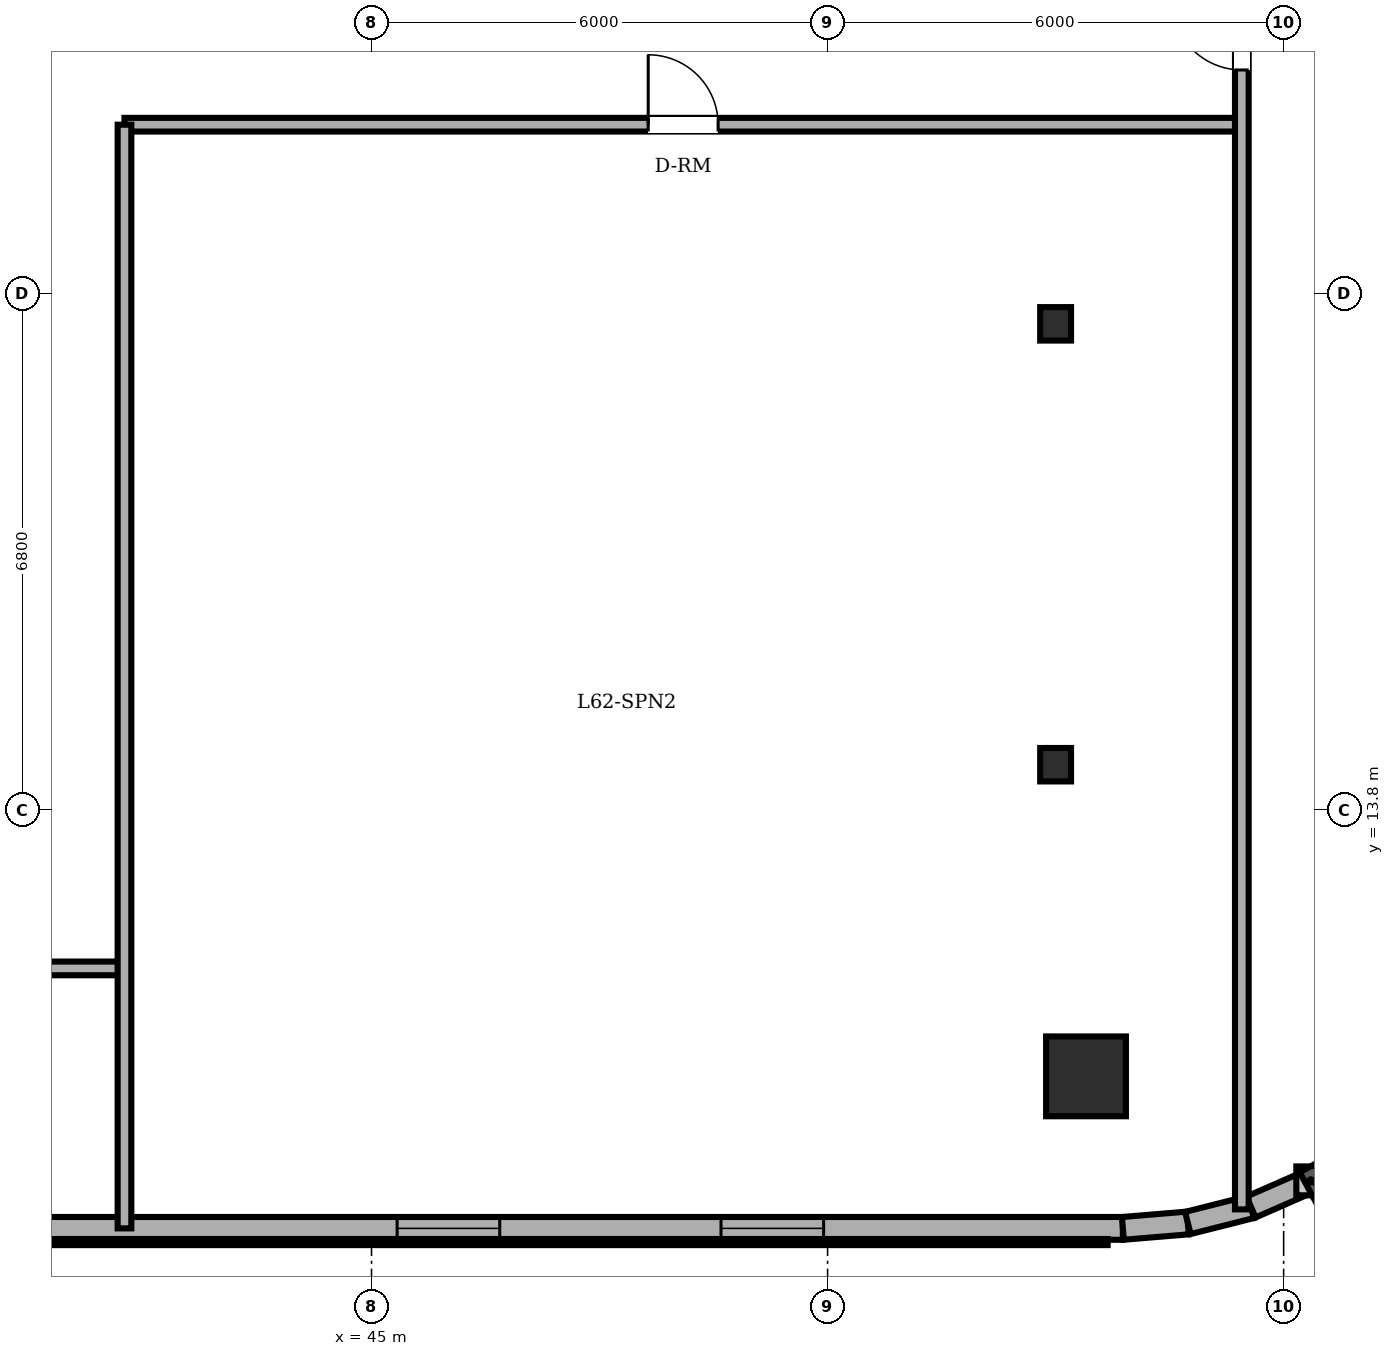
"""IFC4 building model, lengths in metres.
Left out: names, types, materials, properties, quantities, classifications, styles, units other than length and angle.
Written with IfcOpenShell. Run it as: python <this file> out.ifc"""

import sys

from ifc_helpers import new_model, si_unit, direction, frame, frame_2d, origin, origin_2d, place, context, subcontext, project, spatial, rectangle, circle, i_section, extrude, element, fill, save


model = new_model("IFC4")
c1 = context("Model", 3, precision=1e-05, world=origin(), true_north=direction((0.0, 1.0)))
c2 = subcontext(c1, "Body", "Model", "MODEL_VIEW")
j1 = project(units=[si_unit("LENGTHUNIT", "METRE"), si_unit("PLANEANGLEUNIT", "RADIAN")], contexts=[c1])
p1 = place(None, origin())
s1 = spatial("IfcSite", under=j1, at=p1, CompositionType="ELEMENT")
p2 = place(p1, origin())
s2 = spatial("IfcBuilding", under=s1, at=p2, CompositionType="ELEMENT")
p3 = place(p2, frame((0.0, 0.0, 237.3)))
s3 = spatial("IfcBuildingStorey", under=s2, at=p3, CompositionType="ELEMENT", Elevation=237.3)
p4 = place(p3, frame((54.4, 10.3, 0.0), z_axis=(0.0, 0.0, 1.0), x_axis=(1.0, 0.0, 0.0)))
e1 = element("IfcColumn", 1, at=p4, inside=s3, PredefinedType="COLUMN", context=c2, shape_type="SweptSolid", body=[
    extrude(circle(Radius=0.525, at=origin_2d()), origin(), (0.0, 0.0, 1.0), 3.6),
])
for number, where, z_axis, x_axis in (
    (2, (54.0, 14.4, 0.0), (0.0, 0.0, 1.0), (1.0, 0.0, 0.0)),
    (3, (54.0, 20.2, 0.0), (0.0, 0.0, 1.0), (1.0, 0.0, 0.0)),
):
    element("IfcColumn", number, at=place(p3, frame(where, z_axis=z_axis, x_axis=x_axis)), inside=s3, PredefinedType="COLUMN", context=c2, shape_type="SweptSolid", body=[
        extrude(i_section(OverallWidth=0.406, OverallDepth=0.44, WebThickness=0.024, FlangeThickness=0.039, FilletRadius=0.015, at=origin_2d()), origin(), (0.0, 0.0, 1.0), 3.6),
    ])
p5 = place(p3, frame((22.4, 8.3, 0.0), z_axis=(0.0, 0.0, 1.0), x_axis=(1.0, 0.0, 0.0)))
e4 = element("IfcWall", 4, at=p5, inside=s3, PredefinedType="SOLIDWALL", context=c2, shape_type="SweptSolid", body=[
    extrude(rectangle(XDim=32.485, YDim=0.3, at=frame_2d((16.243, 0.0))), origin(), (0.0, 0.0, 1.0), 3.4),
])
p6 = place(p5, frame((5.413, 0.0, 0.0)))
e5 = element("IfcOpeningElement", 5, at=p6, cuts=e4, PredefinedType="OPENING", context=c2, shape_type="SweptSolid", body=[
    extrude(rectangle(XDim=0.95, YDim=2.2, at=frame_2d((0.475, 1.1))), frame((0.0, 0.16, 0.0), z_axis=(0.0, -1.0, 0.0), x_axis=(1.0, 0.0, 0.0)), (0.0, 0.0, 1.0), 0.32),
])
p7 = place(p5, frame((1.3, 0.0, 0.85)))
e6 = element("IfcOpeningElement", 6, at=p7, cuts=e4, PredefinedType="OPENING", context=c2, shape_type="SweptSolid", body=[
    extrude(rectangle(XDim=1.35, YDim=1.55, at=frame_2d((0.675, 0.775))), frame((0.0, 0.16, 0.0), z_axis=(0.0, -1.0, 0.0), x_axis=(1.0, 0.0, 0.0)), (0.0, 0.0, 1.0), 0.32),
])
p8 = place(p5, frame((10.708, 0.0, 0.85)))
e7 = element("IfcOpeningElement", 7, at=p8, cuts=e4, PredefinedType="OPENING", context=c2, shape_type="SweptSolid", body=[
    extrude(rectangle(XDim=1.35, YDim=1.55, at=frame_2d((0.675, 0.775))), frame((0.0, 0.16, 0.0), z_axis=(0.0, -1.0, 0.0), x_axis=(1.0, 0.0, 0.0)), (0.0, 0.0, 1.0), 0.32),
])
p9 = place(p5, frame((14.692, 0.0, 0.85)))
e8 = element("IfcOpeningElement", 8, at=p9, cuts=e4, PredefinedType="OPENING", context=c2, shape_type="SweptSolid", body=[
    extrude(rectangle(XDim=1.35, YDim=1.55, at=frame_2d((0.675, 0.775))), frame((0.0, 0.16, 0.0), z_axis=(0.0, -1.0, 0.0), x_axis=(1.0, 0.0, 0.0)), (0.0, 0.0, 1.0), 0.32),
])
p10 = place(p5, frame((22.937, 0.0, 0.85)))
e9 = element("IfcOpeningElement", 9, at=p10, cuts=e4, PredefinedType="OPENING", context=c2, shape_type="SweptSolid", body=[
    extrude(rectangle(XDim=1.35, YDim=1.55, at=frame_2d((0.675, 0.775))), frame((0.0, 0.16, 0.0), z_axis=(0.0, -1.0, 0.0), x_axis=(1.0, 0.0, 0.0)), (0.0, 0.0, 1.0), 0.32),
])
p11 = place(p5, frame((27.198, 0.0, 0.85)))
e10 = element("IfcOpeningElement", 10, at=p11, cuts=e4, PredefinedType="OPENING", context=c2, shape_type="SweptSolid", body=[
    extrude(rectangle(XDim=1.35, YDim=1.55, at=frame_2d((0.675, 0.775))), frame((0.0, 0.16, 0.0), z_axis=(0.0, -1.0, 0.0), x_axis=(1.0, 0.0, 0.0)), (0.0, 0.0, 1.0), 0.32),
])
p12 = place(p3, frame((54.885, 8.3, 0.0), z_axis=(0.0, 0.0, 1.0), x_axis=(0.996565355958, 0.082809971041, 0.0)))
e11 = element("IfcWall", 11, at=p12, inside=s3, PredefinedType="SOLIDWALL", context=c2, shape_type="SweptSolid", body=[
    extrude(rectangle(XDim=0.858, YDim=0.3, at=frame_2d((0.429, 0.0))), origin(), (0.0, 0.0, 1.0), 3.4),
])
p13 = place(p3, frame((55.74, 8.371, 0.0), z_axis=(0.0, 0.0, 1.0), x_axis=(0.969536346338, 0.244947490555, 0.0)))
e12 = element("IfcWall", 12, at=p13, inside=s3, PredefinedType="SOLIDWALL", context=c2, shape_type="SweptSolid", body=[
    extrude(rectangle(XDim=0.857, YDim=0.3, at=frame_2d((0.429, 0.0))), origin(), (0.0, 0.0, 1.0), 3.4),
])
p14 = place(p3, frame((56.571, 8.581, 0.0), z_axis=(0.0, 0.0, 1.0), x_axis=(0.916085473636, 0.400983048261, 0.0)))
e13 = element("IfcWall", 13, at=p14, inside=s3, PredefinedType="SOLIDWALL", context=c2, shape_type="SweptSolid", body=[
    extrude(rectangle(XDim=0.858, YDim=0.3, at=frame_2d((0.429, 0.0))), origin(), (0.0, 0.0, 1.0), 3.4),
])
p15 = place(p3, frame((17.677, 11.72, 0.0), z_axis=(0.0, 0.0, 1.0), x_axis=(1.0, 0.0, 0.0)))
e14 = element("IfcWall", 14, at=p15, inside=s3, PredefinedType="PARTITIONING", context=c2, shape_type="SweptSolid", body=[
    extrude(rectangle(XDim=24.073, YDim=0.18, at=frame_2d((12.037, 0.0))), origin(), (0.0, 0.0, 1.0), 3.4),
])
p16 = place(p15, frame((9.763, 0.0, 0.0)))
e15 = element("IfcOpeningElement", 15, at=p16, cuts=e14, PredefinedType="OPENING", context=c2, shape_type="SweptSolid", body=[
    extrude(rectangle(XDim=0.92, YDim=2.1, at=frame_2d((0.46, 1.05))), frame((0.0, 0.1, 0.0), z_axis=(0.0, -1.0, 0.0), x_axis=(1.0, 0.0, 0.0)), (0.0, 0.0, 1.0), 0.2),
])
p17 = place(p15, frame((4.063, 0.0, 0.0)))
e16 = element("IfcOpeningElement", 16, at=p17, cuts=e14, PredefinedType="OPENING", context=c2, shape_type="SweptSolid", body=[
    extrude(rectangle(XDim=0.92, YDim=2.1, at=frame_2d((0.46, 1.05))), frame((0.0, 0.1, 0.0), z_axis=(0.0, -1.0, 0.0), x_axis=(1.0, 0.0, 0.0)), (0.0, 0.0, 1.0), 0.2),
])
p18 = place(p15, frame((17.378, 0.0, 0.0)))
e17 = element("IfcOpeningElement", 17, at=p18, cuts=e14, PredefinedType="OPENING", context=c2, shape_type="SweptSolid", body=[
    extrude(rectangle(XDim=0.92, YDim=2.1, at=frame_2d((0.46, 1.05))), frame((0.0, 0.1, 0.0), z_axis=(0.0, -1.0, 0.0), x_axis=(1.0, 0.0, 0.0)), (0.0, 0.0, 1.0), 0.2),
])
p19 = place(p3, frame((41.75, 22.82, 0.0), z_axis=(0.0, 0.0, 1.0), x_axis=(1.0, 0.0, 0.0)))
e18 = element("IfcWall", 18, at=p19, inside=s3, PredefinedType="PARTITIONING", context=c2, shape_type="SweptSolid", body=[
    extrude(rectangle(XDim=14.7, YDim=0.18, at=frame_2d((7.35, 0.0))), origin(), (0.0, 0.0, 1.0), 3.4),
])
p20 = place(p19, frame((6.89, 0.0, 0.0)))
e19 = element("IfcOpeningElement", 19, at=p20, cuts=e18, PredefinedType="OPENING", context=c2, shape_type="SweptSolid", body=[
    extrude(rectangle(XDim=0.92, YDim=2.1, at=frame_2d((0.46, 1.05))), frame((0.0, 0.1, 0.0), z_axis=(0.0, -1.0, 0.0), x_axis=(1.0, 0.0, 0.0)), (0.0, 0.0, 1.0), 0.2),
])
p21 = place(p3, frame((41.75, 8.3, 0.0), z_axis=(0.0, 0.0, 1.0), x_axis=(0.0, 1.0, 0.0)))
e20 = element("IfcWall", 20, at=p21, inside=s3, PredefinedType="PARTITIONING", context=c2, shape_type="SweptSolid", body=[
    extrude(rectangle(XDim=14.52, YDim=0.18, at=frame_2d((7.26, 0.0))), origin(), (0.0, 0.0, 1.0), 3.4),
])
p22 = place(p3, frame((56.45, 8.55, 0.0), z_axis=(0.0, 0.0, 1.0), x_axis=(0.0, 1.0, 0.0)))
e21 = element("IfcWall", 21, at=p22, inside=s3, PredefinedType="PARTITIONING", context=c2, shape_type="SweptSolid", body=[
    extrude(rectangle(XDim=30.9, YDim=0.18, at=frame_2d((15.45, 0.0))), origin(), (0.0, 0.0, 1.0), 3.4),
])
p23 = place(p22, frame((14.99, 0.0, 0.0)))
e22 = element("IfcOpeningElement", 22, at=p23, cuts=e21, PredefinedType="OPENING", context=c2, shape_type="SweptSolid", body=[
    extrude(rectangle(XDim=0.92, YDim=2.1, at=frame_2d((0.46, 1.05))), frame((0.0, 0.1, 0.0), z_axis=(0.0, -1.0, 0.0), x_axis=(1.0, 0.0, 0.0)), (0.0, 0.0, 1.0), 0.2),
])
p24 = place(p10, origin())
e23 = element("IfcWindow", 23, at=p24, inside=s3, PartitioningType="SINGLE_PANEL", PredefinedType="WINDOW", context=c2, shape_type="SweptSolid", body=[
    extrude(rectangle(XDim=1.35, YDim=1.55, at=frame_2d((0.675, 0.775))), frame((0.0, 0.03, 0.0), z_axis=(0.0, -1.0, 0.0), x_axis=(1.0, 0.0, 0.0)), (0.0, 0.0, 1.0), 0.06),
])
fill(e9, e23)
p25 = place(p11, origin())
e24 = element("IfcWindow", 24, at=p25, inside=s3, PartitioningType="SINGLE_PANEL", PredefinedType="WINDOW", context=c2, shape_type="SweptSolid", body=[
    extrude(rectangle(XDim=1.35, YDim=1.55, at=frame_2d((0.675, 0.775))), frame((0.0, 0.03, 0.0), z_axis=(0.0, -1.0, 0.0), x_axis=(1.0, 0.0, 0.0)), (0.0, 0.0, 1.0), 0.06),
])
fill(e10, e24)
p26 = place(p20, origin())
e25 = element("IfcDoor", 25, at=p26, inside=s3, OperationType="SINGLE_SWING_LEFT", PredefinedType="DOOR", context=c2, shape_type="SweptSolid", body=[
    extrude(rectangle(XDim=0.92, YDim=2.1, at=frame_2d((0.46, 1.05))), frame((0.0, 0.025, 0.0), z_axis=(0.0, -1.0, 0.0), x_axis=(1.0, 0.0, 0.0)), (0.0, 0.0, 1.0), 0.05),
])
fill(e19, e25)
p27 = place(p23, origin())
e26 = element("IfcDoor", 26, at=p27, inside=s3, OperationType="SINGLE_SWING_RIGHT", PredefinedType="DOOR", context=c2, shape_type="SweptSolid", body=[
    extrude(rectangle(XDim=0.92, YDim=2.1, at=frame_2d((0.46, 1.05))), frame((0.0, 0.025, 0.0), z_axis=(0.0, -1.0, 0.0), x_axis=(1.0, 0.0, 0.0)), (0.0, 0.0, 1.0), 0.05),
])
fill(e22, e26)
save(model, sys.argv[1])
